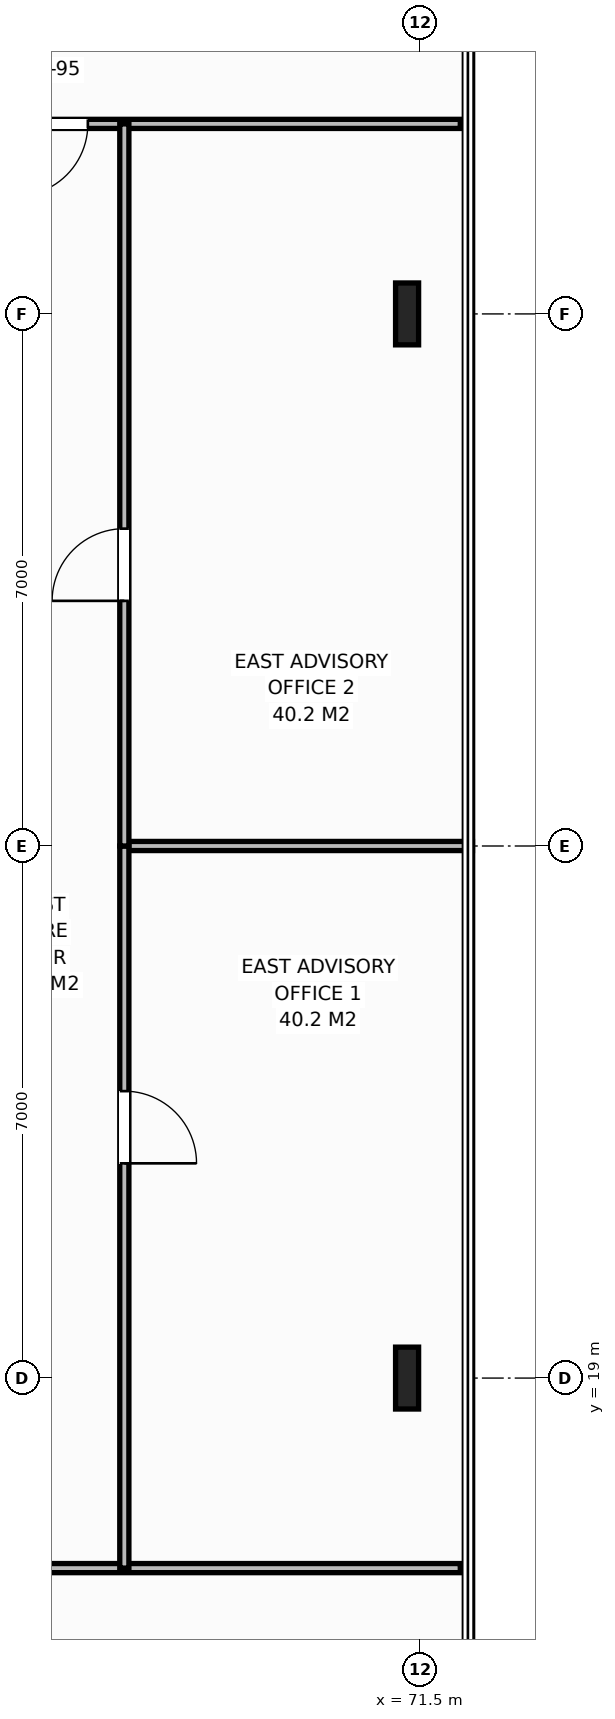
"""IFC4 building model, lengths in metres.
Left out: names, types, materials, properties, quantities, classifications, styles, units other than length and angle.
Written with IfcOpenShell. Run it as: python <this file> out.ifc"""

import sys

from ifc_helpers import new_model, si_unit, direction, frame, frame_2d, origin, origin_2d, place, context, subcontext, project, spatial, rectangle, i_section, extrude, element, fill, save


model = new_model("IFC4")
c1 = context("Model", 3, precision=1e-05, world=origin(), true_north=direction((0.0, 1.0)))
c2 = subcontext(c1, "Body", "Model", "MODEL_VIEW")
j1 = project(units=[si_unit("LENGTHUNIT", "METRE"), si_unit("PLANEANGLEUNIT", "RADIAN")], contexts=[c1])
p1 = place(None, origin())
s1 = spatial("IfcSite", under=j1, at=p1, CompositionType="ELEMENT")
p2 = place(p1, origin())
s2 = spatial("IfcBuilding", under=s1, at=p2, CompositionType="ELEMENT")
p3 = place(p2, frame((0.0, 0.0, 206.2)))
s3 = spatial("IfcBuildingStorey", under=s2, at=p3, CompositionType="ELEMENT", Elevation=206.2)
for number, where, z_axis, x_axis in (
    (1, (71.32, 19.0, 0.0), (0.0, 0.0, 1.0), (1.0, 0.0, 0.0)),
    (2, (71.32, 33.0, 0.0), (0.0, 0.0, 1.0), (1.0, 0.0, 0.0)),
):
    element("IfcColumn", number, at=place(p3, frame(where, z_axis=z_axis, x_axis=x_axis)), inside=s3, PredefinedType="COLUMN", context=c2, shape_type="SweptSolid", body=[
        extrude(i_section(OverallWidth=0.303, OverallDepth=0.814, WebThickness=0.021, FlangeThickness=0.04, at=origin_2d()), origin(), (0.0, 0.0, 1.0), 3.8),
    ])
p4 = place(p3, frame((64.86, 35.5, 0.0), z_axis=(0.0, 0.0, 1.0), x_axis=(1.0, 0.0, 0.0)))
e3 = element("IfcWall", 3, at=p4, inside=s3, PredefinedType="PARTITIONING", context=c2, shape_type="SweptSolid", body=[
    extrude(rectangle(XDim=7.16, YDim=0.12, at=frame_2d((3.58, 0.0))), origin(), (0.0, 0.0, 1.0), 3.58),
])
p5 = place(p4, frame((1.31, 0.0, 0.0)))
e4 = element("IfcOpeningElement", 4, at=p5, cuts=e3, PredefinedType="OPENING", context=c2, shape_type="SweptSolid", body=[
    extrude(rectangle(XDim=0.95, YDim=2.15, at=frame_2d((0.475, 1.075))), frame((0.0, 0.07, 0.0), z_axis=(0.0, -1.0, 0.0), x_axis=(1.0, 0.0, 0.0)), (0.0, 0.0, 1.0), 0.14),
])
p6 = place(p3, frame((58.377, 16.5, 0.0), z_axis=(0.0, 0.0, 1.0), x_axis=(1.0, 0.0, 0.0)))
e5 = element("IfcWall", 5, at=p6, inside=s3, PredefinedType="PARTITIONING", context=c2, shape_type="SweptSolid", body=[
    extrude(rectangle(XDim=13.643, YDim=0.12, at=frame_2d((6.822, 0.0))), origin(), (0.0, 0.0, 1.0), 3.58),
])
p7 = place(p6, frame((4.137, 0.0, 0.0)))
e6 = element("IfcOpeningElement", 6, at=p7, cuts=e5, PredefinedType="OPENING", context=c2, shape_type="SweptSolid", body=[
    extrude(rectangle(XDim=0.95, YDim=2.15, at=frame_2d((0.475, 1.075))), frame((0.0, 0.07, 0.0), z_axis=(0.0, -1.0, 0.0), x_axis=(1.0, 0.0, 0.0)), (0.0, 0.0, 1.0), 0.14),
])
p8 = place(p3, frame((67.6, 26.0, 0.0), z_axis=(0.0, 0.0, 1.0), x_axis=(1.0, 0.0, 0.0)))
e7 = element("IfcWall", 7, at=p8, inside=s3, PredefinedType="PARTITIONING", context=c2, shape_type="SweptSolid", body=[
    extrude(rectangle(XDim=4.58, YDim=0.12, at=frame_2d((2.29, 0.0))), origin(), (0.0, 0.0, 1.0), 3.58),
])
p9 = place(p3, frame((67.6, 16.5, 0.0), z_axis=(0.0, 0.0, 1.0), x_axis=(0.0, 1.0, 0.0)))
e8 = element("IfcWall", 8, at=p9, inside=s3, PredefinedType="PARTITIONING", context=c2, shape_type="SweptSolid", body=[
    extrude(rectangle(XDim=9.5, YDim=0.12, at=frame_2d((4.75, 0.0))), origin(), (0.0, 0.0, 1.0), 3.58),
])
p10 = place(p9, frame((5.325, 0.0, 0.0)))
e9 = element("IfcOpeningElement", 9, at=p10, cuts=e8, PredefinedType="OPENING", context=c2, shape_type="SweptSolid", body=[
    extrude(rectangle(XDim=0.95, YDim=2.15, at=frame_2d((0.475, 1.075))), frame((0.0, 0.07, 0.0), z_axis=(0.0, -1.0, 0.0), x_axis=(1.0, 0.0, 0.0)), (0.0, 0.0, 1.0), 0.14),
])
p11 = place(p3, frame((67.6, 26.0, 0.0), z_axis=(0.0, 0.0, 1.0), x_axis=(0.0, 1.0, 0.0)))
e10 = element("IfcWall", 10, at=p11, inside=s3, PredefinedType="PARTITIONING", context=c2, shape_type="SweptSolid", body=[
    extrude(rectangle(XDim=9.5, YDim=0.12, at=frame_2d((4.75, 0.0))), origin(), (0.0, 0.0, 1.0), 3.58),
])
p12 = place(p11, frame((3.225, 0.0, 0.0)))
e11 = element("IfcOpeningElement", 11, at=p12, cuts=e10, PredefinedType="OPENING", context=c2, shape_type="SweptSolid", body=[
    extrude(rectangle(XDim=0.95, YDim=2.15, at=frame_2d((0.475, 1.075))), frame((0.0, 0.07, 0.0), z_axis=(0.0, -1.0, 0.0), x_axis=(1.0, 0.0, 0.0)), (0.0, 0.0, 1.0), 0.14),
])
p13 = place(p5, origin())
e12 = element("IfcDoor", 12, at=p13, inside=s3, OperationType="SINGLE_SWING_RIGHT", PredefinedType="DOOR", context=c2, shape_type="SweptSolid", body=[
    extrude(rectangle(XDim=0.95, YDim=2.15, at=frame_2d((0.475, 1.075))), frame((0.0, 0.025, 0.0), z_axis=(0.0, -1.0, 0.0), x_axis=(1.0, 0.0, 0.0)), (0.0, 0.0, 1.0), 0.05),
])
fill(e4, e12)
p14 = place(p10, origin())
e13 = element("IfcDoor", 13, at=p14, inside=s3, OperationType="SINGLE_SWING_RIGHT", PredefinedType="DOOR", context=c2, shape_type="SweptSolid", body=[
    extrude(rectangle(XDim=0.95, YDim=2.15, at=frame_2d((0.475, 1.075))), frame((0.0, 0.025, 0.0), z_axis=(0.0, -1.0, 0.0), x_axis=(1.0, 0.0, 0.0)), (0.0, 0.0, 1.0), 0.05),
])
fill(e9, e13)
p15 = place(p12, origin())
e14 = element("IfcDoor", 14, at=p15, inside=s3, OperationType="SINGLE_SWING_LEFT", PredefinedType="DOOR", context=c2, shape_type="SweptSolid", body=[
    extrude(rectangle(XDim=0.95, YDim=2.15, at=frame_2d((0.475, 1.075))), frame((0.0, 0.025, 0.0), z_axis=(0.0, -1.0, 0.0), x_axis=(1.0, 0.0, 0.0)), (0.0, 0.0, 1.0), 0.05),
])
fill(e11, e14)
save(model, sys.argv[1])
